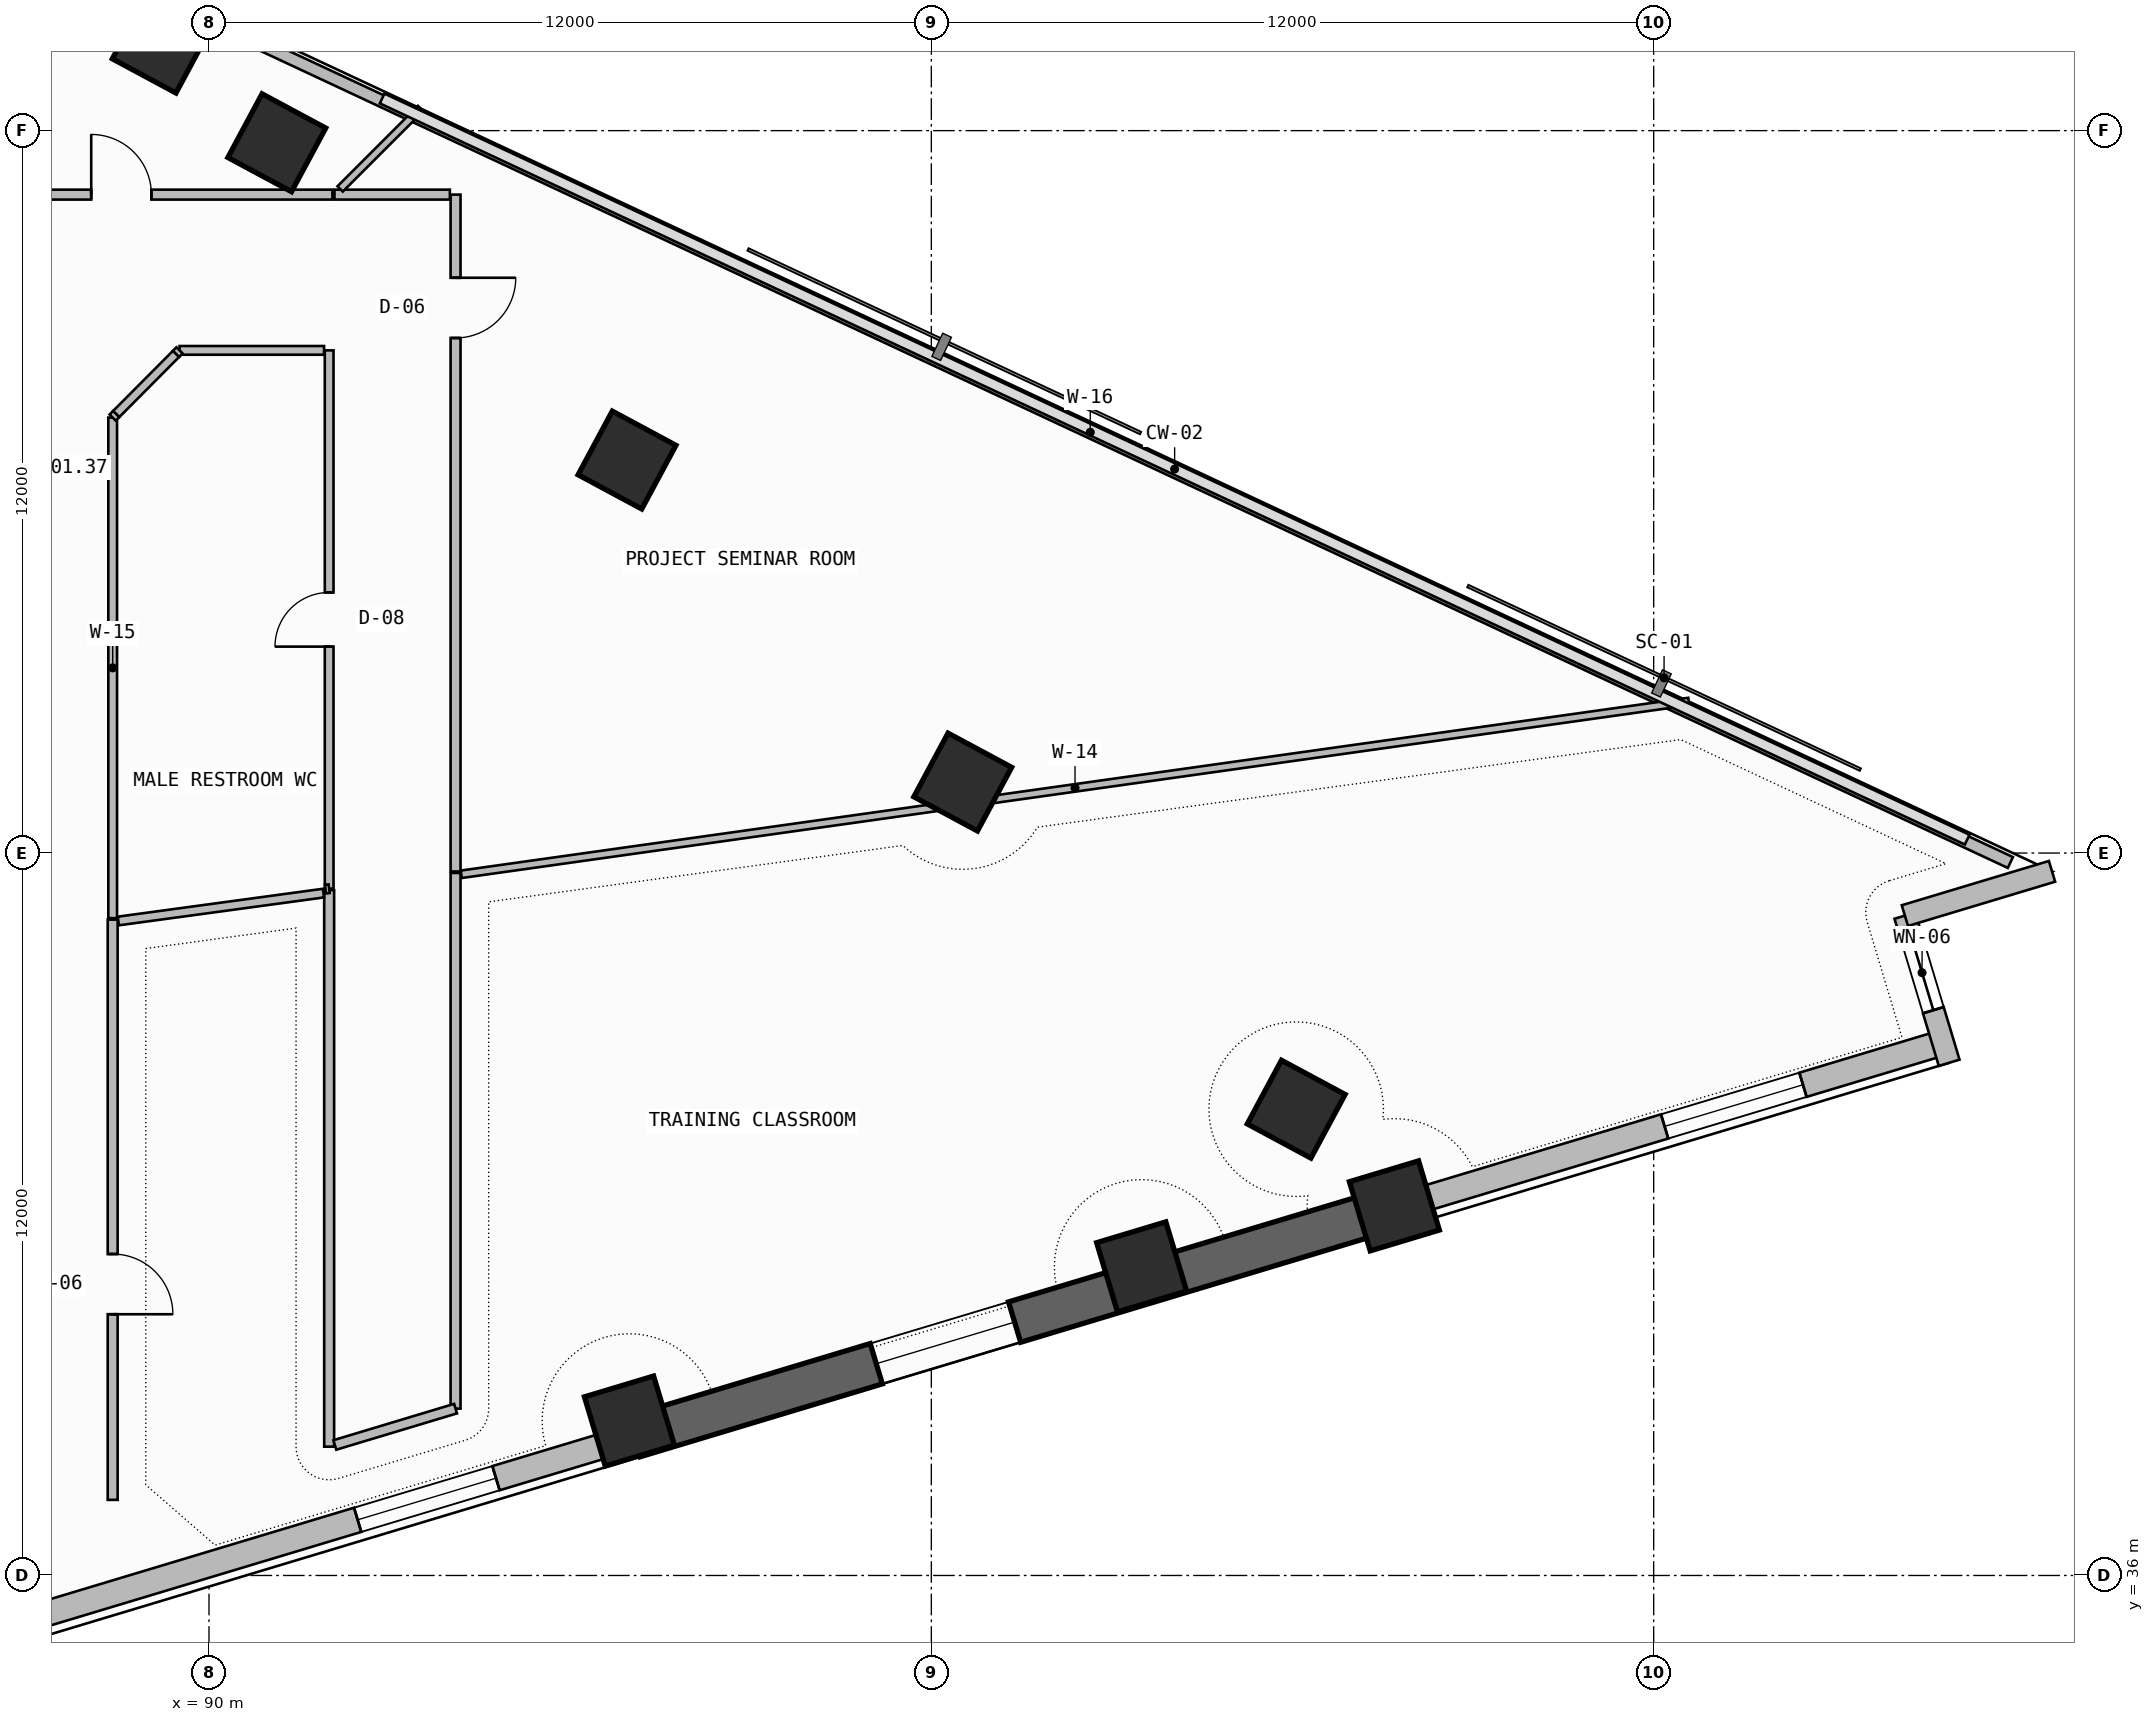
"""IFC4 building model, lengths in metres.
Left out: names, types, materials, properties, quantities, classifications, styles, units other than length and angle.
Written with IfcOpenShell. Run it as: python <this file> out.ifc"""

import sys

from ifc_helpers import new_model, si_unit, direction, frame, frame_2d, origin, origin_2d, place, context, subcontext, project, spatial, rectangle, extrude, element, fill, save


model = new_model("IFC4")
c1 = context("Model", 3, precision=1e-05, world=origin(), true_north=direction((0.0, 1.0)))
c2 = subcontext(c1, "Body", "Model", "MODEL_VIEW")
j1 = project(units=[si_unit("LENGTHUNIT", "METRE"), si_unit("PLANEANGLEUNIT", "RADIAN")], contexts=[c1])
p1 = place(None, origin())
s1 = spatial("IfcSite", under=j1, at=p1, CompositionType="ELEMENT")
p2 = place(p1, origin())
s2 = spatial("IfcBuilding", under=s1, at=p2, CompositionType="ELEMENT")
p3 = place(p2, frame((0.0, 0.0, 132.3)))
s3 = spatial("IfcBuildingStorey", under=s2, at=p3, CompositionType="ELEMENT", Elevation=132.3)
for number, where, z_axis, x_axis in (
    (1, (96.985, 38.565, -0.4), (0.0, 0.0, 1.0), (0.958, 0.288, 0.0)),
    (2, (105.494, 41.126, -0.4), (0.0, 0.0, 1.0), (0.958, 0.288, 0.0)),
):
    element("IfcColumn", number, at=place(p3, frame(where, z_axis=z_axis, x_axis=x_axis)), inside=s3, PredefinedType="COLUMN", context=c2, shape_type="SweptSolid", body=[
        extrude(rectangle(XDim=1.2, YDim=1.2, at=origin_2d()), origin(), (0.0, 0.0, 1.0), 4.0),
    ])
p4 = place(p3, frame((109.693, 42.139, 0.0), z_axis=(0.0, 0.0, 1.0), x_axis=(0.957571360805, 0.288196268134, 0.0)))
e3 = element("IfcColumn", 3, at=p4, inside=s3, PredefinedType="COLUMN", context=c2, shape_type="SweptSolid", body=[
    extrude(rectangle(XDim=1.2, YDim=1.2, at=origin_2d()), origin(), (0.0, 0.0, 1.0), 3.6),
])
for number, where, z_axis, x_axis in (
    (4, (108.061, 43.746, -0.4), (0.0, 0.0, 1.0), (0.473, 0.881, 0.0)),
    (5, (102.522, 49.179, -0.4), (0.0, 0.0, 1.0), (0.473, 0.881, 0.0)),
    (6, (96.944, 54.528, -0.4), (0.0, 0.0, 1.0), (0.473, 0.881, 0.0)),
    (7, (91.126, 59.798, -0.4), (0.0, 0.0, 1.0), (0.473, 0.881, 0.0)),
):
    element("IfcColumn", number, at=place(p3, frame(where, z_axis=z_axis, x_axis=x_axis)), inside=s3, PredefinedType="COLUMN", context=c2, shape_type="SweptSolid", body=[
        extrude(rectangle(XDim=1.2, YDim=1.2, at=origin_2d()), origin(), (0.0, 0.0, 1.0), 4.0),
    ])
p5 = place(p3, frame((89.207, 61.438, 0.0), z_axis=(0.0, 0.0, 1.0), x_axis=(0.473319667185, 0.880890738205, 0.0)))
e8 = element("IfcColumn", 8, at=p5, inside=s3, PredefinedType="COLUMN", context=c2, shape_type="SweptSolid", body=[
    extrude(rectangle(XDim=1.2, YDim=1.2, at=origin_2d()), origin(), (0.0, 0.0, 1.0), 3.6),
])
p6 = place(p3, frame((86.1, 35.007, 0.0), z_axis=(0.0, 0.0, 1.0), x_axis=(0.957569401796, 0.288202777129, 0.0)))
e9 = element("IfcWall", 9, at=p6, inside=s3, PredefinedType="SOLIDWALL", context=c2, shape_type="SweptSolid", body=[
    extrude(rectangle(XDim=11.448, YDim=0.42, at=frame_2d((5.724, 0.0))), origin(), (0.0, 0.0, 1.0), 2.325),
])
p7 = place(p6, frame((6.652, 0.0, 1.2)))
e10 = element("IfcOpeningElement", 10, at=p7, cuts=e9, PredefinedType="OPENING", context=c2, shape_type="SweptSolid", body=[
    extrude(rectangle(XDim=2.4, YDim=0.9, at=frame_2d((1.2, 0.45))), frame((0.0, 0.22, 0.0), z_axis=(0.0, -1.0, 0.0), x_axis=(1.0, 0.0, 0.0)), (0.0, 0.0, 1.0), 0.44),
])
p8 = place(p3, frame((97.062, 38.307, -0.4), z_axis=(0.0, 0.0, 1.0), x_axis=(0.957569832102, 0.288201347408, 0.0)))
e11 = element("IfcWall", 11, at=p8, inside=s3, PredefinedType="SHEAR", context=c2, shape_type="SweptSolid", body=[
    extrude(rectangle(XDim=13.199, YDim=0.7, at=frame_2d((6.6, 0.0))), origin(), (0.0, 0.0, 1.0), 3.74),
])
p9 = place(p8, frame((4.201, 0.0, 1.2)))
e12 = element("IfcOpeningElement", 12, at=p9, cuts=e11, PredefinedType="OPENING", context=c2, shape_type="SweptSolid", body=[
    extrude(rectangle(XDim=2.4, YDim=0.9, at=frame_2d((1.2, 0.45))), frame((0.0, 0.36, 0.0), z_axis=(0.0, -1.0, 0.0), x_axis=(1.0, 0.0, 0.0)), (0.0, 0.0, 1.0), 0.72),
])
p10 = place(p3, frame((109.701, 42.111, 0.0), z_axis=(0.0, 0.0, 1.0), x_axis=(0.957575807765, 0.288181492091, 0.0)))
e13 = element("IfcWall", 13, at=p10, inside=s3, PredefinedType="SOLIDWALL", context=c2, shape_type="SweptSolid", body=[
    extrude(rectangle(XDim=9.51, YDim=0.42, at=frame_2d((4.755, 0.0))), origin(), (0.0, 0.0, 1.0), 2.325),
])
p11 = place(p10, frame((4.679, 0.0, 1.2)))
e14 = element("IfcOpeningElement", 14, at=p11, cuts=e13, PredefinedType="OPENING", context=c2, shape_type="SweptSolid", body=[
    extrude(rectangle(XDim=2.4, YDim=0.9, at=frame_2d((1.2, 0.45))), frame((0.0, 0.22, 0.0), z_axis=(0.0, -1.0, 0.0), x_axis=(1.0, 0.0, 0.0)), (0.0, 0.0, 1.0), 0.44),
])
p12 = place(p3, frame((118.909, 44.516, 0.0), z_axis=(0.0, 0.0, 1.0), x_axis=(-0.288172590882, 0.95757848653, 0.0)))
e15 = element("IfcWall", 15, at=p12, inside=s3, PredefinedType="SOLIDWALL", context=c2, shape_type="SweptSolid", body=[
    extrude(rectangle(XDim=2.553, YDim=0.36, at=frame_2d((1.276, 0.0))), origin(), (0.0, 0.0, 1.0), 3.34),
])
p13 = place(p12, frame((0.913, 0.0, 0.45)))
e16 = element("IfcOpeningElement", 16, at=p13, cuts=e15, PredefinedType="OPENING", context=c2, shape_type="SweptSolid", body=[
    extrude(rectangle(XDim=1.3, YDim=2.4, at=frame_2d((0.65, 1.2))), frame((0.0, 0.19, 0.0), z_axis=(0.0, -1.0, 0.0), x_axis=(1.0, 0.0, 0.0)), (0.0, 0.0, 1.0), 0.38),
])
p14 = place(p3, frame((118.173, 46.96, 0.0), z_axis=(0.0, 0.0, 1.0), x_axis=(0.95757848653, 0.288172590882, 0.0)))
e17 = element("IfcWall", 17, at=p14, inside=s3, PredefinedType="SOLIDWALL", context=c2, shape_type="SweptSolid", body=[
    extrude(rectangle(XDim=2.553, YDim=0.36, at=frame_2d((1.276, 0.0))), origin(), (0.0, 0.0, 1.0), 3.34),
])
p15 = place(p3, frame((119.926, 47.843, 0.0), z_axis=(0.0, 0.0, 1.0), x_axis=(-0.905880730846, 0.423532881228, 0.0)))
e18 = element("IfcWall", 18, at=p15, inside=s3, PredefinedType="PARAPET", context=c2, shape_type="SweptSolid", body=[
    extrude(rectangle(XDim=33.748, YDim=0.2, at=frame_2d((16.874, 0.0))), origin(), (0.0, 0.0, 1.0), 1.15),
])
p16 = place(p3, frame((88.4, 37.256, 0.0), z_axis=(0.0, 0.0, 1.0), x_axis=(0.0, 1.0, 0.0)))
e19 = element("IfcWall", 19, at=p16, inside=s3, PredefinedType="PARTITIONING", context=c2, shape_type="SweptSolid", body=[
    extrude(rectangle(XDim=9.638, YDim=0.165, at=frame_2d((4.819, 0.0))), origin(), (0.0, 0.0, 1.0), 2.725),
])
p17 = place(p16, frame((3.083, 0.0, 0.0)))
e20 = element("IfcOpeningElement", 20, at=p17, cuts=e19, PredefinedType="OPENING", context=c2, shape_type="SweptSolid", body=[
    extrude(rectangle(XDim=1.0, YDim=2.2, at=frame_2d((0.5, 1.1))), frame((0.0, 0.093, 0.0), z_axis=(0.0, -1.0, 0.0), x_axis=(1.0, 0.0, 0.0)), (0.0, 0.0, 1.0), 0.185),
])
p18 = place(p3, frame((91.996, 47.384, 0.0), z_axis=(0.0, 0.0, 1.0), x_axis=(0.0, -1.0, 0.0)))
e21 = element("IfcWall", 21, at=p18, inside=s3, PredefinedType="PARTITIONING", context=c2, shape_type="SweptSolid", body=[
    extrude(rectangle(XDim=9.244, YDim=0.165, at=frame_2d((4.622, 0.0))), origin(), (0.0, 0.0, 1.0), 2.725),
])
p19 = place(p3, frame((94.096, 38.771, 0.0), z_axis=(0.0, 0.0, 1.0), x_axis=(0.0, 1.0, 0.0)))
e22 = element("IfcWall", 22, at=p19, inside=s3, PredefinedType="PARTITIONING", context=c2, shape_type="SweptSolid", body=[
    extrude(rectangle(XDim=8.898, YDim=0.165, at=frame_2d((4.449, 0.0))), origin(), (0.0, 0.0, 1.0), 2.725),
])
p20 = place(p3, frame((92.091, 38.168, 0.0), z_axis=(0.0, 0.0, 1.0), x_axis=(0.957575652527, 0.288182007919, 0.0)))
e23 = element("IfcWall", 23, at=p20, inside=s3, PredefinedType="PARTITIONING", context=c2, shape_type="SweptSolid", body=[
    extrude(rectangle(XDim=2.094, YDim=0.165, at=frame_2d((1.047, 0.0))), origin(), (0.0, 0.0, 1.0), 3.34),
])
p21 = place(p3, frame((94.191, 47.647, 0.0), z_axis=(0.0, 0.0, 1.0), x_axis=(0.99024252498, 0.139354733403, 0.0)))
e24 = element("IfcWall", 24, at=p21, inside=s3, PredefinedType="PARTITIONING", context=c2, shape_type="SweptSolid", body=[
    extrude(rectangle(XDim=20.594, YDim=0.125, at=frame_2d((10.297, 0.0))), origin(), (0.0, 0.0, 1.0), 2.725),
])
p22 = place(p3, frame((88.494, 46.872, 0.0), z_axis=(0.0, 0.0, 1.0), x_axis=(0.990889260198, 0.134679152153, 0.0)))
e25 = element("IfcWall", 25, at=p22, inside=s3, PredefinedType="PARTITIONING", context=c2, shape_type="SweptSolid", body=[
    extrude(rectangle(XDim=3.439, YDim=0.145, at=frame_2d((1.719, 0.0))), origin(), (0.0, 0.0, 1.0), 2.925),
])
p23 = place(p3, frame((94.096, 47.694, 0.0), z_axis=(0.0, 0.0, 1.0), x_axis=(0.0, 1.0, 0.0)))
e26 = element("IfcWall", 26, at=p23, inside=s3, PredefinedType="PARTITIONING", context=c2, shape_type="SweptSolid", body=[
    extrude(rectangle(XDim=11.243, YDim=0.165, at=frame_2d((5.622, 0.0))), origin(), (0.0, 0.0, 1.0), 2.725),
])
p24 = place(p23, frame((8.862, 0.0, 0.0)))
e27 = element("IfcOpeningElement", 27, at=p24, cuts=e26, PredefinedType="OPENING", context=c2, shape_type="SweptSolid", body=[
    extrude(rectangle(XDim=1.0, YDim=2.2, at=frame_2d((0.5, 1.1))), frame((0.0, 0.093, 0.0), z_axis=(0.0, -1.0, 0.0), x_axis=(1.0, 0.0, 0.0)), (0.0, 0.0, 1.0), 0.185),
])
p25 = place(p3, frame((94.002, 58.937, 0.0), z_axis=(0.0, 0.0, 1.0), x_axis=(-1.0, 0.0, 0.0)))
e28 = element("IfcWall", 28, at=p25, inside=s3, PredefinedType="PARTITIONING", context=c2, shape_type="SweptSolid", body=[
    extrude(rectangle(XDim=1.917, YDim=0.165, at=frame_2d((0.959, 0.0))), origin(), (0.0, 0.0, 1.0), 2.725),
])
p26 = place(p3, frame((92.179, 59.031, 0.0), z_axis=(0.0, 0.0, 1.0), x_axis=(0.707106781187, 0.707106781187, 0.0)))
e29 = element("IfcWall", 29, at=p26, inside=s3, PredefinedType="PARTITIONING", context=c2, shape_type="SweptSolid", body=[
    extrude(rectangle(XDim=1.89, YDim=0.125, at=frame_2d((0.945, 0.0))), origin(), (0.0, 0.0, 1.0), 2.725),
])
p27 = place(p3, frame((91.996, 56.35, 0.0), z_axis=(0.0, 0.0, 1.0), x_axis=(0.0, -1.0, 0.0)))
e30 = element("IfcWall", 30, at=p27, inside=s3, PredefinedType="PARTITIONING", context=c2, shape_type="SweptSolid", body=[
    extrude(rectangle(XDim=8.942, YDim=0.145, at=frame_2d((4.471, 0.0))), origin(), (0.0, 0.0, 1.0), 2.725),
])
p28 = place(p27, frame((4.021, 0.0, 0.0)))
e31 = element("IfcOpeningElement", 31, at=p28, cuts=e30, PredefinedType="OPENING", context=c2, shape_type="SweptSolid", body=[
    extrude(rectangle(XDim=0.9, YDim=2.1, at=frame_2d((0.45, 1.05))), frame((0.0, 0.083, 0.0), z_axis=(0.0, -1.0, 0.0), x_axis=(1.0, 0.0, 0.0)), (0.0, 0.0, 1.0), 0.165),
])
p29 = place(p3, frame((88.4, 46.919, 0.0), z_axis=(0.0, 0.0, 1.0), x_axis=(0.0, 1.0, 0.0)))
e32 = element("IfcWall", 32, at=p29, inside=s3, PredefinedType="PARTITIONING", context=c2, shape_type="SweptSolid", body=[
    extrude(rectangle(XDim=8.315, YDim=0.145, at=frame_2d((4.157, 0.0))), origin(), (0.0, 0.0, 1.0), 3.34),
])
p30 = place(p3, frame((89.511, 56.35, 0.0), z_axis=(0.0, 0.0, 1.0), x_axis=(1.0, 0.0, 0.0)))
e33 = element("IfcWall", 33, at=p30, inside=s3, PredefinedType="PARTITIONING", context=c2, shape_type="SweptSolid", body=[
    extrude(rectangle(XDim=2.401, YDim=0.145, at=frame_2d((1.201, 0.0))), origin(), (0.0, 0.0, 1.0), 2.925),
])
p31 = place(p3, frame((88.4, 55.233, 0.0), z_axis=(0.0, 0.0, 1.0), x_axis=(0.705671035809, 0.708539617255, 0.0)))
e34 = element("IfcWall", 34, at=p31, inside=s3, PredefinedType="PARTITIONING", context=c2, shape_type="SweptSolid", body=[
    extrude(rectangle(XDim=0.085, YDim=0.145, at=frame_2d((0.042, 0.0))), origin(), (0.0, 0.0, 1.0), 3.34),
])
p32 = place(p3, frame((89.451, 56.29, 0.0), z_axis=(0.0, 0.0, 1.0), x_axis=(0.704214765071, 0.709987017244, 0.0)))
e35 = element("IfcWall", 35, at=p32, inside=s3, PredefinedType="PARTITIONING", context=c2, shape_type="SweptSolid", body=[
    extrude(rectangle(XDim=0.084, YDim=0.145, at=frame_2d((0.042, 0.0))), origin(), (0.0, 0.0, 1.0), 2.925),
])
p33 = place(p3, frame((91.996, 47.408, 0.0), z_axis=(0.0, 0.0, 1.0), x_axis=(-0.991122022459, -0.132955393257, 0.0)))
e36 = element("IfcWall", 36, at=p33, inside=s3, PredefinedType="PARTITIONING", context=c2, shape_type="SweptSolid", body=[
    extrude(rectangle(XDim=0.061, YDim=0.145, at=frame_2d((0.03, 0.0))), origin(), (0.0, 0.0, 1.0), 3.34),
])
p34 = place(p3, frame((92.05, 58.937, 0.0), z_axis=(0.0, 0.0, 1.0), x_axis=(-1.0, 0.0, 0.0)))
e37 = element("IfcWall", 37, at=p34, inside=s3, PredefinedType="PARTITIONING", context=c2, shape_type="SweptSolid", body=[
    extrude(rectangle(XDim=14.159, YDim=0.165, at=frame_2d((7.08, 0.0))), origin(), (0.0, 0.0, 1.0), 2.725),
])
p35 = place(p34, frame((3.007, 0.0, 0.0)))
e38 = element("IfcOpeningElement", 38, at=p35, cuts=e37, PredefinedType="OPENING", context=c2, shape_type="SweptSolid", body=[
    extrude(rectangle(XDim=1.0, YDim=2.2, at=frame_2d((0.5, 1.1))), frame((0.0, 0.093, 0.0), z_axis=(0.0, -1.0, 0.0), x_axis=(1.0, 0.0, 0.0)), (0.0, 0.0, 1.0), 0.185),
])
p36 = place(p3, frame((88.46, 55.294, 0.0), z_axis=(0.0, 0.0, 1.0), x_axis=(0.705280427547, 0.708928429758, 0.0)))
e39 = element("IfcWall", 39, at=p36, inside=s3, PredefinedType="PARTITIONING", context=c2, shape_type="SweptSolid", body=[
    extrude(rectangle(XDim=1.406, YDim=0.145, at=frame_2d((0.703, 0.0))), origin(), (0.0, 0.0, 1.0), 2.725),
])
p37 = place(p7, origin())
e40 = element("IfcWindow", 40, at=p37, inside=s3, PartitioningType="SINGLE_PANEL", PredefinedType="WINDOW", context=c2, shape_type="SweptSolid", body=[
    extrude(rectangle(XDim=2.4, YDim=0.9, at=frame_2d((1.2, 0.45))), frame((0.0, 0.03, 0.0), z_axis=(0.0, -1.0, 0.0), x_axis=(1.0, 0.0, 0.0)), (0.0, 0.0, 1.0), 0.06),
])
fill(e10, e40)
p38 = place(p9, origin())
e41 = element("IfcWindow", 41, at=p38, inside=s3, PartitioningType="SINGLE_PANEL", PredefinedType="WINDOW", context=c2, shape_type="SweptSolid", body=[
    extrude(rectangle(XDim=2.4, YDim=0.9, at=frame_2d((1.2, 0.45))), frame((0.0, 0.03, 0.0), z_axis=(0.0, -1.0, 0.0), x_axis=(1.0, 0.0, 0.0)), (0.0, 0.0, 1.0), 0.06),
])
fill(e12, e41)
p39 = place(p11, origin())
e42 = element("IfcWindow", 42, at=p39, inside=s3, PartitioningType="SINGLE_PANEL", PredefinedType="WINDOW", context=c2, shape_type="SweptSolid", body=[
    extrude(rectangle(XDim=2.4, YDim=0.9, at=frame_2d((1.2, 0.45))), frame((0.0, 0.03, 0.0), z_axis=(0.0, -1.0, 0.0), x_axis=(1.0, 0.0, 0.0)), (0.0, 0.0, 1.0), 0.06),
])
fill(e14, e42)
p40 = place(p13, origin())
e43 = element("IfcWindow", 43, at=p40, inside=s3, PartitioningType="SINGLE_PANEL", PredefinedType="WINDOW", context=c2, shape_type="SweptSolid", body=[
    extrude(rectangle(XDim=1.3, YDim=2.4, at=frame_2d((0.65, 1.2))), frame((0.0, 0.03, 0.0), z_axis=(0.0, -1.0, 0.0), x_axis=(1.0, 0.0, 0.0)), (0.0, 0.0, 1.0), 0.06),
])
fill(e16, e43)
p41 = place(p17, frame((1.0, 0.0, 0.0), z_axis=(0.0, 0.0, 1.0), x_axis=(-1.0, 0.0, 0.0)))
e44 = element("IfcDoor", 44, at=p41, inside=s3, OperationType="SINGLE_SWING_RIGHT", PredefinedType="DOOR", context=c2, shape_type="SweptSolid", body=[
    extrude(rectangle(XDim=1.0, YDim=2.2, at=frame_2d((0.5, 1.1))), frame((0.0, 0.025, 0.0), z_axis=(0.0, -1.0, 0.0), x_axis=(1.0, 0.0, 0.0)), (0.0, 0.0, 1.0), 0.05),
])
fill(e20, e44)
p42 = place(p24, frame((1.0, 0.0, 0.0), z_axis=(0.0, 0.0, 1.0), x_axis=(-1.0, 0.0, 0.0)))
e45 = element("IfcDoor", 45, at=p42, inside=s3, OperationType="SINGLE_SWING_LEFT", PredefinedType="DOOR", context=c2, shape_type="SweptSolid", body=[
    extrude(rectangle(XDim=1.0, YDim=2.2, at=frame_2d((0.5, 1.1))), frame((0.0, 0.025, 0.0), z_axis=(0.0, -1.0, 0.0), x_axis=(1.0, 0.0, 0.0)), (0.0, 0.0, 1.0), 0.05),
])
fill(e27, e45)
p43 = place(p28, frame((0.9, 0.0, 0.0), z_axis=(0.0, 0.0, 1.0), x_axis=(-1.0, 0.0, 0.0)))
e46 = element("IfcDoor", 46, at=p43, inside=s3, OperationType="SINGLE_SWING_LEFT", PredefinedType="DOOR", context=c2, shape_type="SweptSolid", body=[
    extrude(rectangle(XDim=0.9, YDim=2.1, at=frame_2d((0.45, 1.05))), frame((0.0, 0.025, 0.0), z_axis=(0.0, -1.0, 0.0), x_axis=(1.0, 0.0, 0.0)), (0.0, 0.0, 1.0), 0.05),
])
fill(e31, e46)
p44 = place(p35, frame((1.0, 0.0, 0.0), z_axis=(0.0, 0.0, 1.0), x_axis=(-1.0, 0.0, 0.0)))
e47 = element("IfcDoor", 47, at=p44, inside=s3, OperationType="SINGLE_SWING_LEFT", PredefinedType="DOOR", context=c2, shape_type="SweptSolid", body=[
    extrude(rectangle(XDim=1.0, YDim=2.2, at=frame_2d((0.5, 1.1))), frame((0.0, 0.025, 0.0), z_axis=(0.0, -1.0, 0.0), x_axis=(1.0, 0.0, 0.0)), (0.0, 0.0, 1.0), 0.05),
])
fill(e38, e47)
save(model, sys.argv[1])
